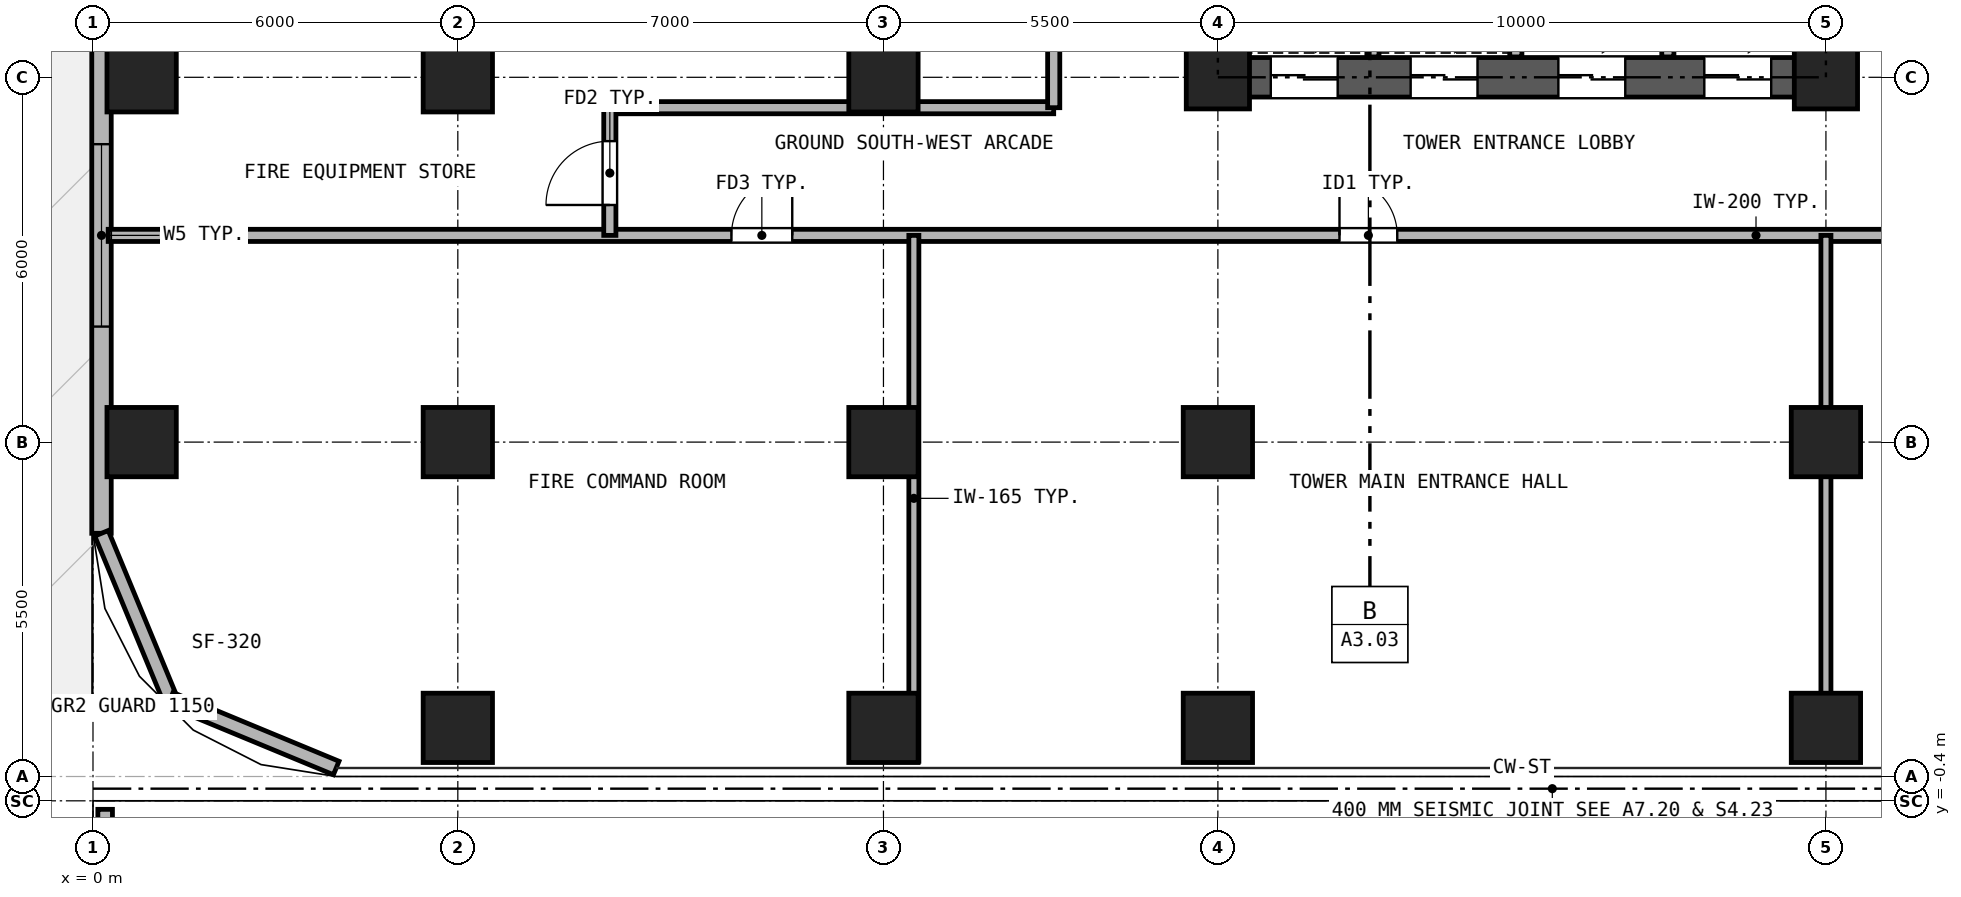
"""IFC4 building model, lengths in metres.
Left out: names, types, materials, properties, quantities, classifications, styles, units other than length and angle.
Written with IfcOpenShell. Run it as: python <this file> out.ifc"""

import sys

from ifc_helpers import new_model, si_unit, direction, frame, frame_2d, origin, origin_2d, place, context, subcontext, project, spatial, rectangle, hollow_rectangle, extrude, source, transform, mapped, element, fill, save


model = new_model("IFC4")
c1 = context("Model", 3, precision=1e-05, world=origin(), true_north=direction((0.0, 1.0)))
c2 = subcontext(c1, "Body", "Model", "MODEL_VIEW")
j1 = project(units=[si_unit("LENGTHUNIT", "METRE"), si_unit("PLANEANGLEUNIT", "RADIAN")], contexts=[c1])
p1 = place(None, origin())
s1 = spatial("IfcSite", under=j1, at=p1, CompositionType="ELEMENT")
p2 = place(p1, origin())
s2 = spatial("IfcBuilding", under=s1, at=p2, CompositionType="ELEMENT")
p3 = place(p2, origin())
s3 = spatial("IfcBuildingStorey", under=s2, at=p3, CompositionType="ELEMENT", Elevation=0.0)
m1 = source(origin(), c2, "Body", "SweptSolid", [
    extrude(hollow_rectangle(XDim=1.14, YDim=1.14, WallThickness=0.07, at=origin_2d()), origin(), (0.0, 0.0, 1.0), 4.18),
])
for number, where, z_axis, x_axis in (
    (1, (6.0, 0.8, 0.0), (0.0, 0.0, 1.0), (1.0, 0.0, 0.0)),
    (2, (13.0, 0.8, 0.0), (0.0, 0.0, 1.0), (1.0, 0.0, 0.0)),
    (3, (18.5, 0.8, 0.0), (0.0, 0.0, 1.0), (1.0, 0.0, 0.0)),
    (4, (28.5, 0.8, 0.0), (0.0, 0.0, 1.0), (1.0, 0.0, 0.0)),
    (5, (0.8, 5.5, 0.0), (0.0, 0.0, 1.0), (1.0, 0.0, 0.0)),
    (6, (0.8, 11.5, 0.0), (0.0, 0.0, 1.0), (1.0, 0.0, 0.0)),
    (7, (6.0, 5.5, 0.0), (0.0, 0.0, 1.0), (1.0, 0.0, 0.0)),
    (8, (6.0, 11.5, 0.0), (0.0, 0.0, 1.0), (1.0, 0.0, 0.0)),
    (9, (13.0, 5.5, 0.0), (0.0, 0.0, 1.0), (1.0, 0.0, 0.0)),
    (10, (13.0, 11.5, 0.0), (0.0, 0.0, 1.0), (1.0, 0.0, 0.0)),
    (11, (18.5, 5.5, 0.0), (0.0, 0.0, 1.0), (1.0, 0.0, 0.0)),
):
    element("IfcColumn", number, at=place(p3, frame(where, z_axis=z_axis, x_axis=x_axis)), inside=s3, PredefinedType="COLUMN", context=c2, shape_type="MappedRepresentation", body=[
        mapped(m1, transform((0.0, 0.0, 0.0), x_axis=(1.0, 0.0, 0.0), y_axis=(0.0, 1.0, 0.0), z_axis=(0.0, 0.0, 1.0), scale=1.0)),
    ])
m2 = source(origin(), c2, "Body", "SweptSolid", [
    extrude(hollow_rectangle(XDim=1.04, YDim=1.04, WallThickness=0.065, at=origin_2d()), origin(), (0.0, 0.0, 1.0), 4.18),
])
p4 = place(p3, frame((18.5, 11.5, 0.0), z_axis=(0.0, 0.0, 1.0), x_axis=(1.0, 0.0, 0.0)))
e12 = element("IfcColumn", 12, at=p4, inside=s3, PredefinedType="COLUMN", context=c2, shape_type="MappedRepresentation", body=[
    mapped(m2, transform((0.0, 0.0, 0.0), x_axis=(1.0, 0.0, 0.0), y_axis=(0.0, 1.0, 0.0), z_axis=(0.0, 0.0, 1.0), scale=1.0)),
])
p5 = place(p3, frame((28.5, 5.5, 0.0), z_axis=(0.0, 0.0, 1.0), x_axis=(1.0, 0.0, 0.0)))
e13 = element("IfcColumn", 13, at=p5, inside=s3, PredefinedType="COLUMN", context=c2, shape_type="MappedRepresentation", body=[
    mapped(m1, transform((0.0, 0.0, 0.0), x_axis=(1.0, 0.0, 0.0), y_axis=(0.0, 1.0, 0.0), z_axis=(0.0, 0.0, 1.0), scale=1.0)),
])
p6 = place(p3, frame((28.5, 11.5, 0.0), z_axis=(0.0, 0.0, 1.0), x_axis=(1.0, 0.0, 0.0)))
e14 = element("IfcColumn", 14, at=p6, inside=s3, PredefinedType="COLUMN", context=c2, shape_type="MappedRepresentation", body=[
    mapped(m2, transform((0.0, 0.0, 0.0), x_axis=(1.0, 0.0, 0.0), y_axis=(0.0, 1.0, 0.0), z_axis=(0.0, 0.0, 1.0), scale=1.0)),
])
p7 = place(p3, frame((0.14, 4.0, 0.0), z_axis=(0.0, 0.0, 1.0), x_axis=(0.0, 1.0, 0.0)))
e15 = element("IfcWall", 15, at=p7, inside=s3, PredefinedType="SOLIDWALL", context=c2, shape_type="SweptSolid", body=[
    extrude(rectangle(XDim=32.5, YDim=0.32, at=frame_2d((16.25, 0.0))), origin(), (0.0, 0.0, 1.0), 4.18),
])
p8 = place(p7, frame((9.8, 0.0, 0.0)))
e16 = element("IfcOpeningElement", 16, at=p8, cuts=e15, PredefinedType="OPENING", context=c2, shape_type="SweptSolid", body=[
    extrude(rectangle(XDim=2.2, YDim=2.5, at=frame_2d((1.1, 1.25))), frame((0.0, 0.17, 0.0), z_axis=(0.0, -1.0, 0.0), x_axis=(1.0, 0.0, 0.0)), (0.0, 0.0, 1.0), 0.34),
])
p9 = place(p7, frame((3.4, 0.0, 0.9)))
e17 = element("IfcOpeningElement", 17, at=p9, cuts=e15, PredefinedType="OPENING", context=c2, shape_type="SweptSolid", body=[
    extrude(rectangle(XDim=3.0, YDim=2.25, at=frame_2d((1.5, 1.125))), frame((0.0, 0.17, 0.0), z_axis=(0.0, -1.0, 0.0), x_axis=(1.0, 0.0, 0.0)), (0.0, 0.0, 1.0), 0.34),
])
p10 = place(p7, frame((14.8, 0.0, 0.9)))
e18 = element("IfcOpeningElement", 18, at=p10, cuts=e15, PredefinedType="OPENING", context=c2, shape_type="SweptSolid", body=[
    extrude(rectangle(XDim=3.0, YDim=2.25, at=frame_2d((1.5, 1.125))), frame((0.0, 0.17, 0.0), z_axis=(0.0, -1.0, 0.0), x_axis=(1.0, 0.0, 0.0)), (0.0, 0.0, 1.0), 0.34),
])
p11 = place(p7, frame((26.3, 0.0, 0.9)))
e19 = element("IfcOpeningElement", 19, at=p11, cuts=e15, PredefinedType="OPENING", context=c2, shape_type="SweptSolid", body=[
    extrude(rectangle(XDim=3.0, YDim=2.25, at=frame_2d((1.5, 1.125))), frame((0.0, 0.17, 0.0), z_axis=(0.0, -1.0, 0.0), x_axis=(1.0, 0.0, 0.0)), (0.0, 0.0, 1.0), 0.34),
])
for number, where, z_axis, x_axis in (
    (20, (0.14, 4.0, 0.0), (0.0, 0.0, 1.0), (0.383, -0.924, 0.0)),
    (21, (1.271, 1.271, 0.0), (0.0, 0.0, 1.0), (0.924, -0.383, 0.0)),
):
    element("IfcWall", number, at=place(p3, frame(where, z_axis=z_axis, x_axis=x_axis)), inside=s3, PredefinedType="SOLIDWALL", context=c2, shape_type="SweptSolid", body=[
        extrude(rectangle(XDim=2.954, YDim=0.24, at=frame_2d((1.477, 0.0))), origin(), (0.0, 0.0, 1.0), 4.18),
    ])
p12 = place(p3, frame((0.2, -10.95, 0.0), z_axis=(0.0, 0.0, 1.0), x_axis=(0.0, 1.0, 0.0)))
e22 = element("IfcWall", 22, at=p12, inside=s3, PredefinedType="SOLIDWALL", context=c2, shape_type="SweptSolid", body=[
    extrude(rectangle(XDim=10.41, YDim=0.24, at=frame_2d((5.205, 0.0))), origin(), (0.0, 0.0, 1.0), 4.18),
])
p13 = place(p3, frame((18.175, 11.5, 0.0), z_axis=(0.0, 0.0, 1.0), x_axis=(1.0, 0.0, 0.0)))
e23 = element("IfcWall", 23, at=p13, inside=s3, PredefinedType="SHEAR", context=c2, shape_type="SweptSolid", body=[
    extrude(rectangle(XDim=10.65, YDim=0.65, at=frame_2d((5.325, 0.0))), origin(), (0.0, 0.0, 1.0), 4.18),
])
p14 = place(p13, frame((1.195, 0.0, 0.0)))
e24 = element("IfcOpeningElement", 24, at=p14, cuts=e23, PredefinedType="OPENING", context=c2, shape_type="SweptSolid", body=[
    extrude(rectangle(XDim=1.1, YDim=2.25, at=frame_2d((0.55, 1.125))), frame((0.0, 0.335, 0.0), z_axis=(0.0, -1.0, 0.0), x_axis=(1.0, 0.0, 0.0)), (0.0, 0.0, 1.0), 0.67),
])
p15 = place(p13, frame((3.495, 0.0, 0.0)))
e25 = element("IfcOpeningElement", 25, at=p15, cuts=e23, PredefinedType="OPENING", context=c2, shape_type="SweptSolid", body=[
    extrude(rectangle(XDim=1.1, YDim=2.25, at=frame_2d((0.55, 1.125))), frame((0.0, 0.335, 0.0), z_axis=(0.0, -1.0, 0.0), x_axis=(1.0, 0.0, 0.0)), (0.0, 0.0, 1.0), 0.67),
])
p16 = place(p13, frame((5.925, 0.0, 0.0)))
e26 = element("IfcOpeningElement", 26, at=p16, cuts=e23, PredefinedType="OPENING", context=c2, shape_type="SweptSolid", body=[
    extrude(rectangle(XDim=1.1, YDim=2.25, at=frame_2d((0.55, 1.125))), frame((0.0, 0.335, 0.0), z_axis=(0.0, -1.0, 0.0), x_axis=(1.0, 0.0, 0.0)), (0.0, 0.0, 1.0), 0.67),
])
p17 = place(p13, frame((8.325, 0.0, 0.0)))
e27 = element("IfcOpeningElement", 27, at=p17, cuts=e23, PredefinedType="OPENING", context=c2, shape_type="SweptSolid", body=[
    extrude(rectangle(XDim=1.1, YDim=2.25, at=frame_2d((0.55, 1.125))), frame((0.0, 0.335, 0.0), z_axis=(0.0, -1.0, 0.0), x_axis=(1.0, 0.0, 0.0)), (0.0, 0.0, 1.0), 0.67),
])
p18 = place(p3, frame((18.5, 11.825, 0.0), z_axis=(0.0, 0.0, 1.0), x_axis=(0.0, 1.0, 0.0)))
e28 = element("IfcWall", 28, at=p18, inside=s3, PredefinedType="SHEAR", context=c2, shape_type="SweptSolid", body=[
    extrude(rectangle(XDim=16.6, YDim=0.65, at=frame_2d((8.3, 0.0))), origin(), (0.0, 0.0, 1.0), 4.18),
])
p19 = place(p18, frame((7.325, 0.0, 0.0)))
e29 = element("IfcOpeningElement", 29, at=p19, cuts=e28, PredefinedType="OPENING", context=c2, shape_type="SweptSolid", body=[
    extrude(rectangle(XDim=1.15, YDim=2.2, at=frame_2d((0.575, 1.1))), frame((0.0, 0.335, 0.0), z_axis=(0.0, -1.0, 0.0), x_axis=(1.0, 0.0, 0.0)), (0.0, 0.0, 1.0), 0.67),
])
p20 = place(p3, frame((28.5, 11.825, 0.0), z_axis=(0.0, 0.0, 1.0), x_axis=(0.0, 1.0, 0.0)))
e30 = element("IfcWall", 30, at=p20, inside=s3, PredefinedType="SHEAR", context=c2, shape_type="SweptSolid", body=[
    extrude(rectangle(XDim=16.6, YDim=0.65, at=frame_2d((8.3, 0.0))), origin(), (0.0, 0.0, 1.0), 4.18),
])
p21 = place(p20, frame((7.325, 0.0, 0.0)))
e31 = element("IfcOpeningElement", 31, at=p21, cuts=e30, PredefinedType="OPENING", context=c2, shape_type="SweptSolid", body=[
    extrude(rectangle(XDim=1.15, YDim=2.2, at=frame_2d((0.575, 1.1))), frame((0.0, 0.335, 0.0), z_axis=(0.0, -1.0, 0.0), x_axis=(1.0, 0.0, 0.0)), (0.0, 0.0, 1.0), 0.67),
])
for number, where, z_axis, x_axis in (
    (32, (21.05, 11.835, 0.0), (0.0, 0.0, 1.0), (0.0, 1.0, 0.0)),
    (33, (23.4, 11.835, 0.0), (0.0, 0.0, 1.0), (0.0, 1.0, 0.0)),
    (34, (25.9, 11.835, 0.0), (0.0, 0.0, 1.0), (0.0, 1.0, 0.0)),
):
    element("IfcWall", number, at=place(p3, frame(where, z_axis=z_axis, x_axis=x_axis)), inside=s3, PredefinedType="PARTITIONING", context=c2, shape_type="SweptSolid", body=[
        extrude(rectangle(XDim=3.165, YDim=0.2, at=frame_2d((1.583, 0.0))), origin(), (0.0, 0.0, 1.0), 4.18),
    ])
p22 = place(p3, frame((0.25, 8.9, 0.0), z_axis=(0.0, 0.0, 1.0), x_axis=(1.0, 0.0, 0.0)))
e35 = element("IfcWall", 35, at=p22, inside=s3, PredefinedType="PARTITIONING", context=c2, shape_type="SweptSolid", body=[
    extrude(rectangle(XDim=46.5, YDim=0.2, at=frame_2d((23.25, 0.0))), origin(), (0.0, 0.0, 1.0), 4.18),
])
p23 = place(p22, frame((10.25, 0.0, 0.0)))
e36 = element("IfcOpeningElement", 36, at=p23, cuts=e35, PredefinedType="OPENING", context=c2, shape_type="SweptSolid", body=[
    extrude(rectangle(XDim=1.0, YDim=2.15, at=frame_2d((0.5, 1.075))), frame((0.0, 0.11, 0.0), z_axis=(0.0, -1.0, 0.0), x_axis=(1.0, 0.0, 0.0)), (0.0, 0.0, 1.0), 0.22),
])
p24 = place(p22, frame((20.25, 0.0, 0.0)))
e37 = element("IfcOpeningElement", 37, at=p24, cuts=e35, PredefinedType="OPENING", context=c2, shape_type="SweptSolid", body=[
    extrude(rectangle(XDim=0.95, YDim=2.15, at=frame_2d((0.475, 1.075))), frame((0.0, 0.11, 0.0), z_axis=(0.0, -1.0, 0.0), x_axis=(1.0, 0.0, 0.0)), (0.0, 0.0, 1.0), 0.22),
])
p25 = place(p22, frame((33.0, 0.0, 0.0)))
e38 = element("IfcOpeningElement", 38, at=p25, cuts=e35, PredefinedType="OPENING", context=c2, shape_type="SweptSolid", body=[
    extrude(rectangle(XDim=0.95, YDim=2.15, at=frame_2d((0.475, 1.075))), frame((0.0, 0.11, 0.0), z_axis=(0.0, -1.0, 0.0), x_axis=(1.0, 0.0, 0.0)), (0.0, 0.0, 1.0), 0.22),
])
p26 = place(p22, frame((40.25, 0.0, 0.0)))
e39 = element("IfcOpeningElement", 39, at=p26, cuts=e35, PredefinedType="OPENING", context=c2, shape_type="SweptSolid", body=[
    extrude(rectangle(XDim=0.92, YDim=2.1, at=frame_2d((0.46, 1.05))), frame((0.0, 0.11, 0.0), z_axis=(0.0, -1.0, 0.0), x_axis=(1.0, 0.0, 0.0)), (0.0, 0.0, 1.0), 0.22),
])
p27 = place(p22, frame((44.125, 0.0, 0.0)))
e40 = element("IfcOpeningElement", 40, at=p27, cuts=e35, PredefinedType="OPENING", context=c2, shape_type="SweptSolid", body=[
    extrude(rectangle(XDim=0.92, YDim=2.1, at=frame_2d((0.46, 1.05))), frame((0.0, 0.11, 0.0), z_axis=(0.0, -1.0, 0.0), x_axis=(1.0, 0.0, 0.0)), (0.0, 0.0, 1.0), 0.22),
])
p28 = place(p3, frame((8.5, 11.0, 0.0), z_axis=(0.0, 0.0, 1.0), x_axis=(1.0, 0.0, 0.0)))
e41 = element("IfcWall", 41, at=p28, inside=s3, PredefinedType="PARTITIONING", context=c2, shape_type="SweptSolid", body=[
    extrude(rectangle(XDim=7.3, YDim=0.2, at=frame_2d((3.65, 0.0))), origin(), (0.0, 0.0, 1.0), 4.18),
])
p29 = place(p3, frame((8.5, 8.9, 0.0), z_axis=(0.0, 0.0, 1.0), x_axis=(0.0, 1.0, 0.0)))
e42 = element("IfcWall", 42, at=p29, inside=s3, PredefinedType="PARTITIONING", context=c2, shape_type="SweptSolid", body=[
    extrude(rectangle(XDim=2.1, YDim=0.2, at=frame_2d((1.05, 0.0))), origin(), (0.0, 0.0, 1.0), 4.18),
])
p30 = place(p29, frame((0.5, 0.0, 0.0)))
e43 = element("IfcOpeningElement", 43, at=p30, cuts=e42, PredefinedType="OPENING", context=c2, shape_type="SweptSolid", body=[
    extrude(rectangle(XDim=1.05, YDim=2.15, at=frame_2d((0.525, 1.075))), frame((0.0, 0.11, 0.0), z_axis=(0.0, -1.0, 0.0), x_axis=(1.0, 0.0, 0.0)), (0.0, 0.0, 1.0), 0.22),
])
p31 = place(p3, frame((15.8, 11.0, 0.0), z_axis=(0.0, 0.0, 1.0), x_axis=(0.0, 1.0, 0.0)))
e44 = element("IfcWall", 44, at=p31, inside=s3, PredefinedType="PARTITIONING", context=c2, shape_type="SweptSolid", body=[
    extrude(rectangle(XDim=29.25, YDim=0.2, at=frame_2d((14.625, 0.0))), origin(), (0.0, 0.0, 1.0), 4.18),
])
p32 = place(p31, frame((6.0, 0.0, 0.0)))
e45 = element("IfcOpeningElement", 45, at=p32, cuts=e44, PredefinedType="OPENING", context=c2, shape_type="SweptSolid", body=[
    extrude(rectangle(XDim=0.95, YDim=2.15, at=frame_2d((0.475, 1.075))), frame((0.0, 0.11, 0.0), z_axis=(0.0, -1.0, 0.0), x_axis=(1.0, 0.0, 0.0)), (0.0, 0.0, 1.0), 0.22),
])
p33 = place(p31, frame((20.625, 0.0, 0.0)))
e46 = element("IfcOpeningElement", 46, at=p33, cuts=e44, PredefinedType="OPENING", context=c2, shape_type="SweptSolid", body=[
    extrude(rectangle(XDim=0.95, YDim=2.15, at=frame_2d((0.475, 1.075))), frame((0.0, 0.11, 0.0), z_axis=(0.0, -1.0, 0.0), x_axis=(1.0, 0.0, 0.0)), (0.0, 0.0, 1.0), 0.22),
])
p34 = place(p3, frame((13.5, 0.25, 0.0), z_axis=(0.0, 0.0, 1.0), x_axis=(0.0, 1.0, 0.0)))
e47 = element("IfcWall", 47, at=p34, inside=s3, PredefinedType="PARTITIONING", context=c2, shape_type="SweptSolid", body=[
    extrude(rectangle(XDim=8.65, YDim=0.165, at=frame_2d((4.325, 0.0))), origin(), (0.0, 0.0, 1.0), 4.18),
])
p35 = place(p3, frame((28.5, 0.25, 0.0), z_axis=(0.0, 0.0, 1.0), x_axis=(0.0, 1.0, 0.0)))
e48 = element("IfcWall", 48, at=p35, inside=s3, PredefinedType="PARTITIONING", context=c2, shape_type="SweptSolid", body=[
    extrude(rectangle(XDim=8.65, YDim=0.165, at=frame_2d((4.325, 0.0))), origin(), (0.0, 0.0, 1.0), 3.253),
])
p36 = place(p9, origin())
e49 = element("IfcWindow", 49, at=p36, inside=s3, PartitioningType="SINGLE_PANEL", PredefinedType="WINDOW", context=c2, shape_type="SweptSolid", body=[
    extrude(rectangle(XDim=3.0, YDim=2.25, at=frame_2d((1.5, 1.125))), frame((0.0, 0.03, 0.0), z_axis=(0.0, -1.0, 0.0), x_axis=(1.0, 0.0, 0.0)), (0.0, 0.0, 1.0), 0.06),
])
fill(e17, e49)
p37 = place(p14, frame((1.1, 0.0, 0.0), z_axis=(0.0, 0.0, 1.0), x_axis=(-1.0, 0.0, 0.0)))
e50 = element("IfcDoor", 50, at=p37, inside=s3, OperationType="DOUBLE_DOOR_SLIDING", PredefinedType="DOOR", context=c2, shape_type="SweptSolid", body=[
    extrude(rectangle(XDim=1.1, YDim=2.25, at=frame_2d((0.55, 1.125))), frame((0.0, 0.025, 0.0), z_axis=(0.0, -1.0, 0.0), x_axis=(1.0, 0.0, 0.0)), (0.0, 0.0, 1.0), 0.05),
])
fill(e24, e50)
p38 = place(p15, frame((1.1, 0.0, 0.0), z_axis=(0.0, 0.0, 1.0), x_axis=(-1.0, 0.0, 0.0)))
e51 = element("IfcDoor", 51, at=p38, inside=s3, OperationType="DOUBLE_DOOR_SLIDING", PredefinedType="DOOR", context=c2, shape_type="SweptSolid", body=[
    extrude(rectangle(XDim=1.1, YDim=2.25, at=frame_2d((0.55, 1.125))), frame((0.0, 0.025, 0.0), z_axis=(0.0, -1.0, 0.0), x_axis=(1.0, 0.0, 0.0)), (0.0, 0.0, 1.0), 0.05),
])
fill(e25, e51)
p39 = place(p16, frame((1.1, 0.0, 0.0), z_axis=(0.0, 0.0, 1.0), x_axis=(-1.0, 0.0, 0.0)))
e52 = element("IfcDoor", 52, at=p39, inside=s3, OperationType="DOUBLE_DOOR_SLIDING", PredefinedType="DOOR", context=c2, shape_type="SweptSolid", body=[
    extrude(rectangle(XDim=1.1, YDim=2.25, at=frame_2d((0.55, 1.125))), frame((0.0, 0.025, 0.0), z_axis=(0.0, -1.0, 0.0), x_axis=(1.0, 0.0, 0.0)), (0.0, 0.0, 1.0), 0.05),
])
fill(e26, e52)
p40 = place(p17, frame((1.1, 0.0, 0.0), z_axis=(0.0, 0.0, 1.0), x_axis=(-1.0, 0.0, 0.0)))
e53 = element("IfcDoor", 53, at=p40, inside=s3, OperationType="DOUBLE_DOOR_SLIDING", PredefinedType="DOOR", context=c2, shape_type="SweptSolid", body=[
    extrude(rectangle(XDim=1.1, YDim=2.25, at=frame_2d((0.55, 1.125))), frame((0.0, 0.025, 0.0), z_axis=(0.0, -1.0, 0.0), x_axis=(1.0, 0.0, 0.0)), (0.0, 0.0, 1.0), 0.05),
])
fill(e27, e53)
p41 = place(p23, frame((1.0, 0.0, 0.0), z_axis=(0.0, 0.0, 1.0), x_axis=(-1.0, 0.0, 0.0)))
e54 = element("IfcDoor", 54, at=p41, inside=s3, OperationType="SINGLE_SWING_RIGHT", PredefinedType="DOOR", context=c2, shape_type="SweptSolid", body=[
    extrude(rectangle(XDim=1.0, YDim=2.15, at=frame_2d((0.5, 1.075))), frame((0.0, 0.025, 0.0), z_axis=(0.0, -1.0, 0.0), x_axis=(1.0, 0.0, 0.0)), (0.0, 0.0, 1.0), 0.05),
])
fill(e36, e54)
p42 = place(p24, frame((0.95, 0.0, 0.0), z_axis=(0.0, 0.0, 1.0), x_axis=(-1.0, 0.0, 0.0)))
e55 = element("IfcDoor", 55, at=p42, inside=s3, OperationType="SINGLE_SWING_LEFT", PredefinedType="DOOR", context=c2, shape_type="SweptSolid", body=[
    extrude(rectangle(XDim=0.95, YDim=2.15, at=frame_2d((0.475, 1.075))), frame((0.0, 0.025, 0.0), z_axis=(0.0, -1.0, 0.0), x_axis=(1.0, 0.0, 0.0)), (0.0, 0.0, 1.0), 0.05),
])
fill(e37, e55)
p43 = place(p30, frame((1.05, 0.0, 0.0), z_axis=(0.0, 0.0, 1.0), x_axis=(-1.0, 0.0, 0.0)))
e56 = element("IfcDoor", 56, at=p43, inside=s3, OperationType="SINGLE_SWING_LEFT", PredefinedType="DOOR", context=c2, shape_type="SweptSolid", body=[
    extrude(rectangle(XDim=1.05, YDim=2.15, at=frame_2d((0.525, 1.075))), frame((0.0, 0.025, 0.0), z_axis=(0.0, -1.0, 0.0), x_axis=(1.0, 0.0, 0.0)), (0.0, 0.0, 1.0), 0.05),
])
fill(e43, e56)
save(model, sys.argv[1])
